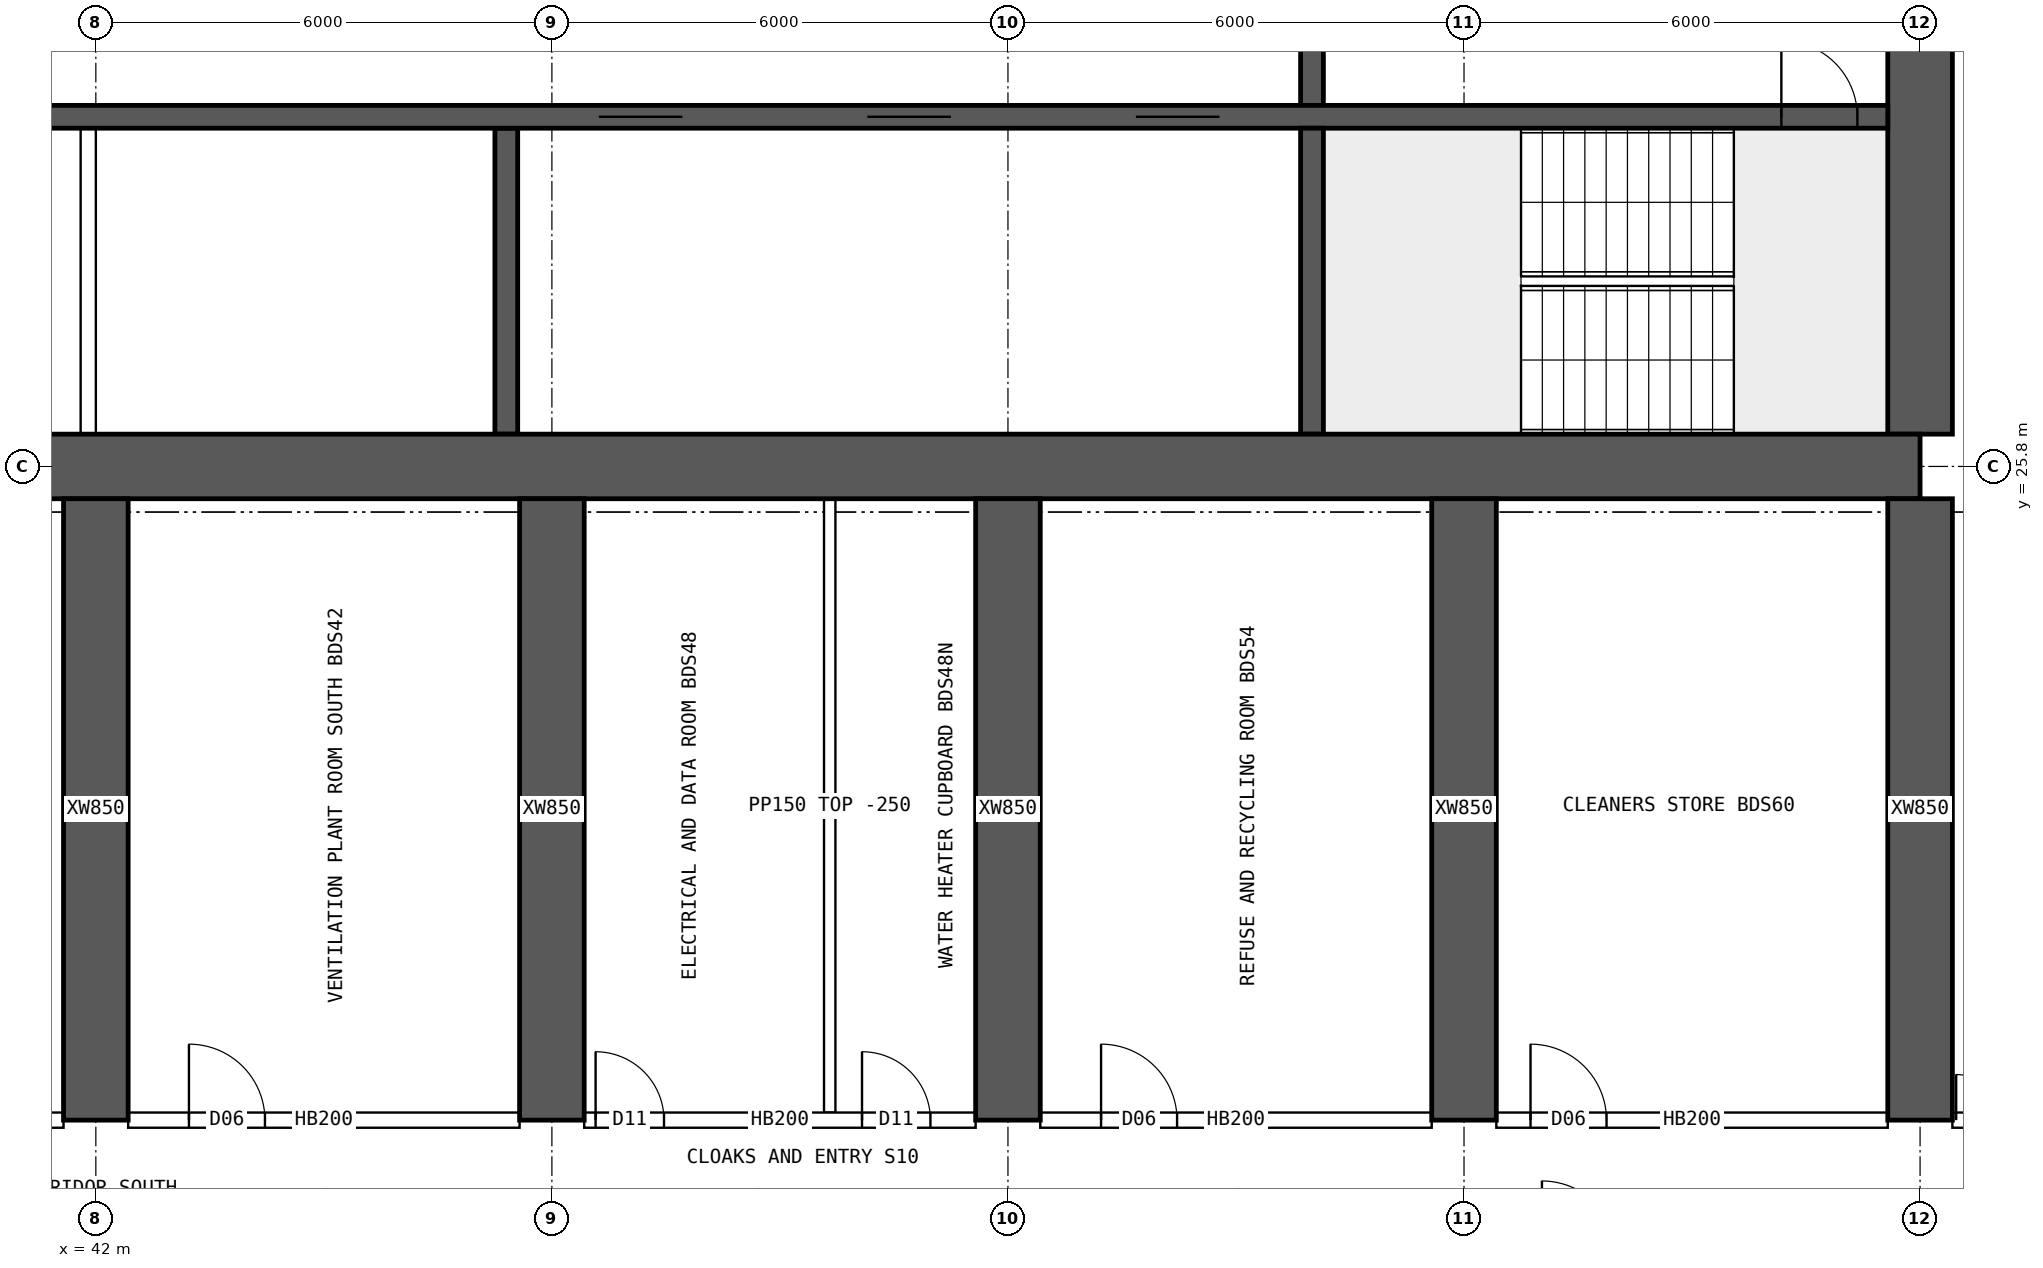
"""IFC4 building model, lengths in metres.
Left out: names, types, materials, properties, quantities, classifications, styles, units other than length and angle.
Written with IfcOpenShell. Run it as: python <this file> out.ifc"""

import sys

from ifc_helpers import new_model, si_unit, direction, frame, frame_2d, origin, place, context, subcontext, project, spatial, rectangle, extrude, element, fill, save


model = new_model("IFC4")
c1 = context("Model", 3, precision=1e-05, world=origin(), true_north=direction((0.0, 1.0)))
c2 = subcontext(c1, "Body", "Model", "MODEL_VIEW")
j1 = project(units=[si_unit("LENGTHUNIT", "METRE"), si_unit("PLANEANGLEUNIT", "RADIAN")], contexts=[c1])
p1 = place(None, origin())
s1 = spatial("IfcSite", under=j1, at=p1, CompositionType="ELEMENT")
p2 = place(p1, origin())
s2 = spatial("IfcBuilding", under=s1, at=p2, CompositionType="ELEMENT")
p3 = place(p2, frame((0.0, 0.0, 163.6)))
s3 = spatial("IfcBuildingStorey", under=s2, at=p3, CompositionType="ELEMENT", Elevation=163.6)
p4 = place(p3, frame((18.0, 25.8, 0.0), z_axis=(0.0, 0.0, 1.0), x_axis=(1.0, 0.0, 0.0)))
e1 = element("IfcWall", 1, at=p4, inside=s3, PredefinedType="SHEAR", context=c2, shape_type="SweptSolid", body=[
    extrude(rectangle(XDim=48.0, YDim=0.85, at=frame_2d((24.0, 0.0))), origin(), (0.0, 0.0, 1.0), 3.75),
])
p5 = place(p3, frame((66.0, 26.225, 0.0), z_axis=(0.0, 0.0, 1.0), x_axis=(0.0, 1.0, 0.0)))
e2 = element("IfcWall", 2, at=p5, inside=s3, PredefinedType="SHEAR", context=c2, shape_type="SweptSolid", body=[
    extrude(rectangle(XDim=11.55, YDim=0.85, at=frame_2d((5.775, 0.0))), origin(), (0.0, 0.0, 1.0), 3.75),
])
p6 = place(p5, frame((5.075, 0.0, 0.0)))
e3 = element("IfcOpeningElement", 3, at=p6, cuts=e2, PredefinedType="OPENING", context=c2, shape_type="SweptSolid", body=[
    extrude(rectangle(XDim=1.2, YDim=2.1, at=frame_2d((0.6, 1.05))), frame((0.0, 0.435, 0.0), z_axis=(0.0, -1.0, 0.0), x_axis=(1.0, 0.0, 0.0)), (0.0, 0.0, 1.0), 0.87),
])
p7 = place(p3, frame((18.425, 30.4, 0.0), z_axis=(0.0, 0.0, 1.0), x_axis=(1.0, 0.0, 0.0)))
e4 = element("IfcWall", 4, at=p7, inside=s3, PredefinedType="SHEAR", context=c2, shape_type="SweptSolid", body=[
    extrude(rectangle(XDim=47.15, YDim=0.3, at=frame_2d((23.575, 0.0))), origin(), (0.0, 0.0, 1.0), 3.75),
])
p8 = place(p7, frame((0.4, 0.0, 0.0)))
e5 = element("IfcOpeningElement", 5, at=p8, cuts=e4, PredefinedType="OPENING", context=c2, shape_type="SweptSolid", body=[
    extrude(rectangle(XDim=1.0, YDim=2.1, at=frame_2d((0.5, 1.05))), frame((0.0, 0.16, 0.0), z_axis=(0.0, -1.0, 0.0), x_axis=(1.0, 0.0, 0.0)), (0.0, 0.0, 1.0), 0.32),
])
p9 = place(p7, frame((45.75, 0.0, 0.0)))
e6 = element("IfcOpeningElement", 6, at=p9, cuts=e4, PredefinedType="OPENING", context=c2, shape_type="SweptSolid", body=[
    extrude(rectangle(XDim=1.0, YDim=2.1, at=frame_2d((0.5, 1.05))), frame((0.0, 0.16, 0.0), z_axis=(0.0, -1.0, 0.0), x_axis=(1.0, 0.0, 0.0)), (0.0, 0.0, 1.0), 0.32),
])
p10 = place(p7, frame((8.325, 0.0, 0.0)))
e7 = element("IfcOpeningElement", 7, at=p10, cuts=e4, PredefinedType="OPENING", context=c2, shape_type="SweptSolid", body=[
    extrude(rectangle(XDim=1.1, YDim=2.1, at=frame_2d((0.55, 1.05))), frame((0.0, 0.16, 0.0), z_axis=(0.0, -1.0, 0.0), x_axis=(1.0, 0.0, 0.0)), (0.0, 0.0, 1.0), 0.32),
])
p11 = place(p7, frame((10.925, 0.0, 0.0)))
e8 = element("IfcOpeningElement", 8, at=p11, cuts=e4, PredefinedType="OPENING", context=c2, shape_type="SweptSolid", body=[
    extrude(rectangle(XDim=1.1, YDim=2.1, at=frame_2d((0.55, 1.05))), frame((0.0, 0.16, 0.0), z_axis=(0.0, -1.0, 0.0), x_axis=(1.0, 0.0, 0.0)), (0.0, 0.0, 1.0), 0.32),
])
p12 = place(p7, frame((13.525, 0.0, 0.0)))
e9 = element("IfcOpeningElement", 9, at=p12, cuts=e4, PredefinedType="OPENING", context=c2, shape_type="SweptSolid", body=[
    extrude(rectangle(XDim=1.1, YDim=2.1, at=frame_2d((0.55, 1.05))), frame((0.0, 0.16, 0.0), z_axis=(0.0, -1.0, 0.0), x_axis=(1.0, 0.0, 0.0)), (0.0, 0.0, 1.0), 0.32),
])
p13 = place(p7, frame((16.125, 0.0, 0.0)))
e10 = element("IfcOpeningElement", 10, at=p13, cuts=e4, PredefinedType="OPENING", context=c2, shape_type="SweptSolid", body=[
    extrude(rectangle(XDim=1.1, YDim=2.1, at=frame_2d((0.55, 1.05))), frame((0.0, 0.16, 0.0), z_axis=(0.0, -1.0, 0.0), x_axis=(1.0, 0.0, 0.0)), (0.0, 0.0, 1.0), 0.32),
])
p14 = place(p7, frame((18.9, 0.0, 0.0)))
e11 = element("IfcOpeningElement", 11, at=p14, cuts=e4, PredefinedType="OPENING", context=c2, shape_type="SweptSolid", body=[
    extrude(rectangle(XDim=0.9, YDim=2.1, at=frame_2d((0.45, 1.05))), frame((0.0, 0.16, 0.0), z_axis=(0.0, -1.0, 0.0), x_axis=(1.0, 0.0, 0.0)), (0.0, 0.0, 1.0), 0.32),
])
p15 = place(p7, frame((30.192, 0.0, 0.0)))
e12 = element("IfcOpeningElement", 12, at=p15, cuts=e4, PredefinedType="OPENING", context=c2, shape_type="SweptSolid", body=[
    extrude(rectangle(XDim=1.1, YDim=2.1, at=frame_2d((0.55, 1.05))), frame((0.0, 0.16, 0.0), z_axis=(0.0, -1.0, 0.0), x_axis=(1.0, 0.0, 0.0)), (0.0, 0.0, 1.0), 0.32),
])
p16 = place(p7, frame((33.725, 0.0, 0.0)))
e13 = element("IfcOpeningElement", 13, at=p16, cuts=e4, PredefinedType="OPENING", context=c2, shape_type="SweptSolid", body=[
    extrude(rectangle(XDim=1.1, YDim=2.1, at=frame_2d((0.55, 1.05))), frame((0.0, 0.16, 0.0), z_axis=(0.0, -1.0, 0.0), x_axis=(1.0, 0.0, 0.0)), (0.0, 0.0, 1.0), 0.32),
])
p17 = place(p7, frame((37.258, 0.0, 0.0)))
e14 = element("IfcOpeningElement", 14, at=p17, cuts=e4, PredefinedType="OPENING", context=c2, shape_type="SweptSolid", body=[
    extrude(rectangle(XDim=1.1, YDim=2.1, at=frame_2d((0.55, 1.05))), frame((0.0, 0.16, 0.0), z_axis=(0.0, -1.0, 0.0), x_axis=(1.0, 0.0, 0.0)), (0.0, 0.0, 1.0), 0.32),
])
p18 = place(p3, frame((58.0, 26.225, 0.0), z_axis=(0.0, 0.0, 1.0), x_axis=(0.0, 1.0, 0.0)))
e15 = element("IfcWall", 15, at=p18, inside=s3, PredefinedType="SHEAR", context=c2, shape_type="SweptSolid", body=[
    extrude(rectangle(XDim=4.025, YDim=0.3, at=frame_2d((2.012, 0.0))), origin(), (0.0, 0.0, 1.0), 3.75),
])
p19 = place(p3, frame((58.0, 30.55, 0.0), z_axis=(0.0, 0.0, 1.0), x_axis=(0.0, 1.0, 0.0)))
e16 = element("IfcWall", 16, at=p19, inside=s3, PredefinedType="SHEAR", context=c2, shape_type="SweptSolid", body=[
    extrude(rectangle(XDim=3.9, YDim=0.3, at=frame_2d((1.95, 0.0))), origin(), (0.0, 0.0, 1.0), 3.75),
])
p20 = place(p19, frame((1.4, 0.0, 0.0)))
e17 = element("IfcOpeningElement", 17, at=p20, cuts=e16, PredefinedType="OPENING", context=c2, shape_type="SweptSolid", body=[
    extrude(rectangle(XDim=1.2, YDim=2.1, at=frame_2d((0.6, 1.05))), frame((0.0, 0.16, 0.0), z_axis=(0.0, -1.0, 0.0), x_axis=(1.0, 0.0, 0.0)), (0.0, 0.0, 1.0), 0.32),
])
p21 = place(p3, frame((47.4, 26.225, 0.0), z_axis=(0.0, 0.0, 1.0), x_axis=(0.0, 1.0, 0.0)))
e18 = element("IfcWall", 18, at=p21, inside=s3, PredefinedType="SHEAR", context=c2, shape_type="SweptSolid", body=[
    extrude(rectangle(XDim=4.025, YDim=0.3, at=frame_2d((2.012, 0.0))), origin(), (0.0, 0.0, 1.0), 3.75),
])
for number, where, z_axis, x_axis in (
    (19, (42.0, 17.2, 0.0), (0.0, 0.0, 1.0), (0.0, 1.0, 0.0)),
    (20, (48.0, 17.2, 0.0), (0.0, 0.0, 1.0), (0.0, 1.0, 0.0)),
    (21, (54.0, 17.2, 0.0), (0.0, 0.0, 1.0), (0.0, 1.0, 0.0)),
    (22, (60.0, 17.2, 0.0), (0.0, 0.0, 1.0), (0.0, 1.0, 0.0)),
    (23, (66.0, 17.2, 0.0), (0.0, 0.0, 1.0), (0.0, 1.0, 0.0)),
):
    element("IfcWall", number, at=place(p3, frame(where, z_axis=z_axis, x_axis=x_axis)), inside=s3, PredefinedType="SHEAR", context=c2, shape_type="SweptSolid", body=[
        extrude(rectangle(XDim=8.175, YDim=0.85, at=frame_2d((4.087, 0.0))), origin(), (0.0, 0.0, 1.0), 3.75),
    ])
p22 = place(p3, frame((41.9, 26.225, 0.0), z_axis=(0.0, 0.0, 1.0), x_axis=(0.0, 1.0, 0.0)))
e24 = element("IfcWall", 24, at=p22, inside=s3, PredefinedType="SOLIDWALL", context=c2, shape_type="SweptSolid", body=[
    extrude(rectangle(XDim=4.025, YDim=0.2, at=frame_2d((2.012, 0.0))), origin(), (0.0, 0.0, 1.0), 3.5),
])
p23 = place(p3, frame((36.425, 17.2, 0.0), z_axis=(0.0, 0.0, 1.0), x_axis=(1.0, 0.0, 0.0)))
e25 = element("IfcWall", 25, at=p23, inside=s3, PredefinedType="SOLIDWALL", context=c2, shape_type="SweptSolid", body=[
    extrude(rectangle(XDim=5.15, YDim=0.2, at=frame_2d((2.575, 0.0))), origin(), (0.0, 0.0, 1.0), 3.5),
])
p24 = place(p23, frame((0.15, 0.0, 0.0)))
e26 = element("IfcOpeningElement", 26, at=p24, cuts=e25, PredefinedType="OPENING", context=c2, shape_type="SweptSolid", body=[
    extrude(rectangle(XDim=0.9, YDim=2.1, at=frame_2d((0.45, 1.05))), frame((0.0, 0.11, 0.0), z_axis=(0.0, -1.0, 0.0), x_axis=(1.0, 0.0, 0.0)), (0.0, 0.0, 1.0), 0.22),
])
p25 = place(p23, frame((2.445, 0.0, 0.0)))
e27 = element("IfcOpeningElement", 27, at=p25, cuts=e25, PredefinedType="OPENING", context=c2, shape_type="SweptSolid", body=[
    extrude(rectangle(XDim=0.9, YDim=2.1, at=frame_2d((0.45, 1.05))), frame((0.0, 0.11, 0.0), z_axis=(0.0, -1.0, 0.0), x_axis=(1.0, 0.0, 0.0)), (0.0, 0.0, 1.0), 0.22),
])
p26 = place(p3, frame((42.425, 17.2, 0.0), z_axis=(0.0, 0.0, 1.0), x_axis=(1.0, 0.0, 0.0)))
e28 = element("IfcWall", 28, at=p26, inside=s3, PredefinedType="SOLIDWALL", context=c2, shape_type="SweptSolid", body=[
    extrude(rectangle(XDim=5.15, YDim=0.2, at=frame_2d((2.575, 0.0))), origin(), (0.0, 0.0, 1.0), 3.5),
])
p27 = place(p26, frame((0.8, 0.0, 0.0)))
e29 = element("IfcOpeningElement", 29, at=p27, cuts=e28, PredefinedType="OPENING", context=c2, shape_type="SweptSolid", body=[
    extrude(rectangle(XDim=1.0, YDim=2.1, at=frame_2d((0.5, 1.05))), frame((0.0, 0.11, 0.0), z_axis=(0.0, -1.0, 0.0), x_axis=(1.0, 0.0, 0.0)), (0.0, 0.0, 1.0), 0.22),
])
p28 = place(p3, frame((48.425, 17.2, 0.0), z_axis=(0.0, 0.0, 1.0), x_axis=(1.0, 0.0, 0.0)))
e30 = element("IfcWall", 30, at=p28, inside=s3, PredefinedType="SOLIDWALL", context=c2, shape_type="SweptSolid", body=[
    extrude(rectangle(XDim=5.15, YDim=0.2, at=frame_2d((2.575, 0.0))), origin(), (0.0, 0.0, 1.0), 3.5),
])
p29 = place(p28, frame((0.15, 0.0, 0.0)))
e31 = element("IfcOpeningElement", 31, at=p29, cuts=e30, PredefinedType="OPENING", context=c2, shape_type="SweptSolid", body=[
    extrude(rectangle(XDim=0.9, YDim=2.1, at=frame_2d((0.45, 1.05))), frame((0.0, 0.11, 0.0), z_axis=(0.0, -1.0, 0.0), x_axis=(1.0, 0.0, 0.0)), (0.0, 0.0, 1.0), 0.22),
])
p30 = place(p28, frame((3.655, 0.0, 0.0)))
e32 = element("IfcOpeningElement", 32, at=p30, cuts=e30, PredefinedType="OPENING", context=c2, shape_type="SweptSolid", body=[
    extrude(rectangle(XDim=0.9, YDim=2.1, at=frame_2d((0.45, 1.05))), frame((0.0, 0.11, 0.0), z_axis=(0.0, -1.0, 0.0), x_axis=(1.0, 0.0, 0.0)), (0.0, 0.0, 1.0), 0.22),
])
p31 = place(p3, frame((54.425, 17.2, 0.0), z_axis=(0.0, 0.0, 1.0), x_axis=(1.0, 0.0, 0.0)))
e33 = element("IfcWall", 33, at=p31, inside=s3, PredefinedType="SOLIDWALL", context=c2, shape_type="SweptSolid", body=[
    extrude(rectangle(XDim=5.15, YDim=0.2, at=frame_2d((2.575, 0.0))), origin(), (0.0, 0.0, 1.0), 3.5),
])
p32 = place(p31, frame((0.8, 0.0, 0.0)))
e34 = element("IfcOpeningElement", 34, at=p32, cuts=e33, PredefinedType="OPENING", context=c2, shape_type="SweptSolid", body=[
    extrude(rectangle(XDim=1.0, YDim=2.1, at=frame_2d((0.5, 1.05))), frame((0.0, 0.11, 0.0), z_axis=(0.0, -1.0, 0.0), x_axis=(1.0, 0.0, 0.0)), (0.0, 0.0, 1.0), 0.22),
])
p33 = place(p3, frame((60.425, 17.2, 0.0), z_axis=(0.0, 0.0, 1.0), x_axis=(1.0, 0.0, 0.0)))
e35 = element("IfcWall", 35, at=p33, inside=s3, PredefinedType="SOLIDWALL", context=c2, shape_type="SweptSolid", body=[
    extrude(rectangle(XDim=5.15, YDim=0.2, at=frame_2d((2.575, 0.0))), origin(), (0.0, 0.0, 1.0), 3.5),
])
p34 = place(p33, frame((0.45, 0.0, 0.0)))
e36 = element("IfcOpeningElement", 36, at=p34, cuts=e35, PredefinedType="OPENING", context=c2, shape_type="SweptSolid", body=[
    extrude(rectangle(XDim=1.0, YDim=2.1, at=frame_2d((0.5, 1.05))), frame((0.0, 0.11, 0.0), z_axis=(0.0, -1.0, 0.0), x_axis=(1.0, 0.0, 0.0)), (0.0, 0.0, 1.0), 0.22),
])
p35 = place(p3, frame((66.425, 17.2, 0.0), z_axis=(0.0, 0.0, 1.0), x_axis=(1.0, 0.0, 0.0)))
e37 = element("IfcWall", 37, at=p35, inside=s3, PredefinedType="SOLIDWALL", context=c2, shape_type="SweptSolid", body=[
    extrude(rectangle(XDim=1.975, YDim=0.2, at=frame_2d((0.987, 0.0))), origin(), (0.0, 0.0, 1.0), 3.5),
])
p36 = place(p35, frame((0.05, 0.0, 0.0)))
e38 = element("IfcOpeningElement", 38, at=p36, cuts=e37, PredefinedType="OPENING", context=c2, shape_type="SweptSolid", body=[
    extrude(rectangle(XDim=1.2, YDim=2.1, at=frame_2d((0.6, 1.05))), frame((0.0, 0.11, 0.0), z_axis=(0.0, -1.0, 0.0), x_axis=(1.0, 0.0, 0.0)), (0.0, 0.0, 1.0), 0.22),
])
p37 = place(p3, frame((51.655, 17.3, 0.0), z_axis=(0.0, 0.0, 1.0), x_axis=(0.0, 1.0, 0.0)))
e39 = element("IfcWall", 39, at=p37, inside=s3, PredefinedType="PARTITIONING", context=c2, shape_type="SweptSolid", body=[
    extrude(rectangle(XDim=8.075, YDim=0.15, at=frame_2d((4.038, 0.0))), origin(), (0.0, 0.0, 1.0), 3.5),
])
p38 = place(p9, origin())
e40 = element("IfcDoor", 40, at=p38, inside=s3, OperationType="SINGLE_SWING_LEFT", PredefinedType="DOOR", context=c2, shape_type="SweptSolid", body=[
    extrude(rectangle(XDim=1.0, YDim=2.1, at=frame_2d((0.5, 1.05))), frame((0.0, 0.025, 0.0), z_axis=(0.0, -1.0, 0.0), x_axis=(1.0, 0.0, 0.0)), (0.0, 0.0, 1.0), 0.05),
])
fill(e6, e40)
p39 = place(p15, origin())
e41 = element("IfcDoor", 41, at=p39, inside=s3, OperationType="DOUBLE_DOOR_SLIDING", PredefinedType="DOOR", context=c2, shape_type="SweptSolid", body=[
    extrude(rectangle(XDim=1.1, YDim=2.1, at=frame_2d((0.55, 1.05))), frame((0.0, 0.025, 0.0), z_axis=(0.0, -1.0, 0.0), x_axis=(1.0, 0.0, 0.0)), (0.0, 0.0, 1.0), 0.05),
])
fill(e12, e41)
p40 = place(p16, origin())
e42 = element("IfcDoor", 42, at=p40, inside=s3, OperationType="DOUBLE_DOOR_SLIDING", PredefinedType="DOOR", context=c2, shape_type="SweptSolid", body=[
    extrude(rectangle(XDim=1.1, YDim=2.1, at=frame_2d((0.55, 1.05))), frame((0.0, 0.025, 0.0), z_axis=(0.0, -1.0, 0.0), x_axis=(1.0, 0.0, 0.0)), (0.0, 0.0, 1.0), 0.05),
])
fill(e13, e42)
p41 = place(p17, origin())
e43 = element("IfcDoor", 43, at=p41, inside=s3, OperationType="DOUBLE_DOOR_SLIDING", PredefinedType="DOOR", context=c2, shape_type="SweptSolid", body=[
    extrude(rectangle(XDim=1.1, YDim=2.1, at=frame_2d((0.55, 1.05))), frame((0.0, 0.025, 0.0), z_axis=(0.0, -1.0, 0.0), x_axis=(1.0, 0.0, 0.0)), (0.0, 0.0, 1.0), 0.05),
])
fill(e14, e43)
p42 = place(p36, origin())
e44 = element("IfcDoor", 44, at=p42, inside=s3, OperationType="DOUBLE_DOOR_SINGLE_SWING", PredefinedType="DOOR", context=c2, shape_type="SweptSolid", body=[
    extrude(rectangle(XDim=1.2, YDim=2.1, at=frame_2d((0.6, 1.05))), frame((0.0, 0.025, 0.0), z_axis=(0.0, -1.0, 0.0), x_axis=(1.0, 0.0, 0.0)), (0.0, 0.0, 1.0), 0.05),
])
fill(e38, e44)
p43 = place(p27, origin())
e45 = element("IfcDoor", 45, at=p43, inside=s3, OperationType="SINGLE_SWING_LEFT", PredefinedType="DOOR", context=c2, shape_type="SweptSolid", body=[
    extrude(rectangle(XDim=1.0, YDim=2.1, at=frame_2d((0.5, 1.05))), frame((0.0, 0.025, 0.0), z_axis=(0.0, -1.0, 0.0), x_axis=(1.0, 0.0, 0.0)), (0.0, 0.0, 1.0), 0.05),
])
fill(e29, e45)
p44 = place(p29, origin())
e46 = element("IfcDoor", 46, at=p44, inside=s3, OperationType="SINGLE_SWING_LEFT", PredefinedType="DOOR", context=c2, shape_type="SweptSolid", body=[
    extrude(rectangle(XDim=0.9, YDim=2.1, at=frame_2d((0.45, 1.05))), frame((0.0, 0.025, 0.0), z_axis=(0.0, -1.0, 0.0), x_axis=(1.0, 0.0, 0.0)), (0.0, 0.0, 1.0), 0.05),
])
fill(e31, e46)
p45 = place(p30, origin())
e47 = element("IfcDoor", 47, at=p45, inside=s3, OperationType="SINGLE_SWING_LEFT", PredefinedType="DOOR", context=c2, shape_type="SweptSolid", body=[
    extrude(rectangle(XDim=0.9, YDim=2.1, at=frame_2d((0.45, 1.05))), frame((0.0, 0.025, 0.0), z_axis=(0.0, -1.0, 0.0), x_axis=(1.0, 0.0, 0.0)), (0.0, 0.0, 1.0), 0.05),
])
fill(e32, e47)
p46 = place(p32, origin())
e48 = element("IfcDoor", 48, at=p46, inside=s3, OperationType="SINGLE_SWING_LEFT", PredefinedType="DOOR", context=c2, shape_type="SweptSolid", body=[
    extrude(rectangle(XDim=1.0, YDim=2.1, at=frame_2d((0.5, 1.05))), frame((0.0, 0.025, 0.0), z_axis=(0.0, -1.0, 0.0), x_axis=(1.0, 0.0, 0.0)), (0.0, 0.0, 1.0), 0.05),
])
fill(e34, e48)
p47 = place(p34, origin())
e49 = element("IfcDoor", 49, at=p47, inside=s3, OperationType="SINGLE_SWING_LEFT", PredefinedType="DOOR", context=c2, shape_type="SweptSolid", body=[
    extrude(rectangle(XDim=1.0, YDim=2.1, at=frame_2d((0.5, 1.05))), frame((0.0, 0.025, 0.0), z_axis=(0.0, -1.0, 0.0), x_axis=(1.0, 0.0, 0.0)), (0.0, 0.0, 1.0), 0.05),
])
fill(e36, e49)
save(model, sys.argv[1])
